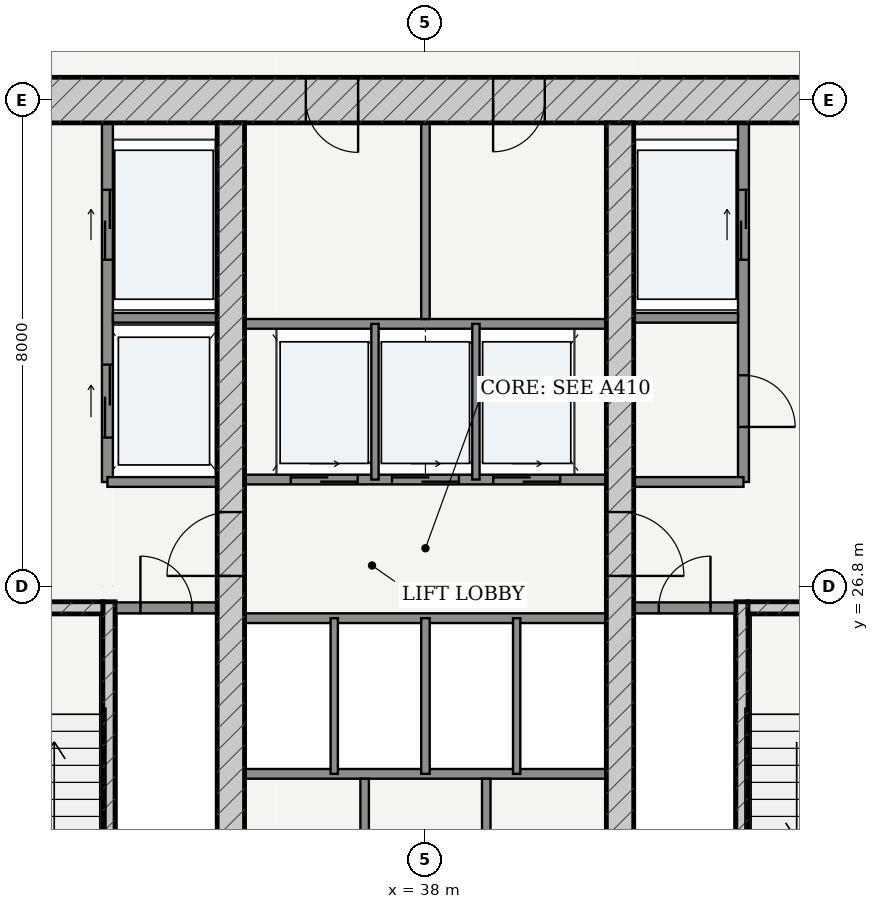
"""IFC4 building model, lengths in metres.
Left out: names, types, materials, properties, quantities, classifications, styles, units other than length and angle.
Written with IfcOpenShell. Run it as: python <this file> out.ifc"""

import sys

from ifc_helpers import new_model, si_unit, direction, frame, frame_2d, origin, place, context, subcontext, project, spatial, rectangle, extrude, source, transform, mapped, element, fill, save


model = new_model("IFC4")
c1 = context("Model", 3, precision=1e-05, world=origin(), true_north=direction((-0.2419218956, 0.970295726276)))
c2 = subcontext(c1, "Body", "Model", "MODEL_VIEW")
j1 = project(units=[si_unit("LENGTHUNIT", "METRE"), si_unit("PLANEANGLEUNIT", "RADIAN")], contexts=[c1])
p1 = place(None, origin())
s1 = spatial("IfcSite", under=j1, at=p1, CompositionType="ELEMENT")
p2 = place(p1, origin())
s2 = spatial("IfcBuilding", under=s1, at=p2, CompositionType="ELEMENT")
p3 = place(p2, frame((0.0, 0.0, 42.0)))
s3 = spatial("IfcBuildingStorey", under=s2, at=p3, CompositionType="ELEMENT", Elevation=42.0)
p4 = place(p3, frame((28.625, 34.8, 0.0), z_axis=(0.0, 0.0, 1.0), x_axis=(1.0, 0.0, 0.0)))
e1 = element("IfcWall", 1, at=p4, inside=s3, PredefinedType="SHEAR", context=c2, shape_type="SweptSolid", body=[
    extrude(rectangle(XDim=18.75, YDim=0.75, at=frame_2d((9.375, 0.0))), origin(), (0.0, 0.0, 1.0), 3.32),
])
p5 = place(p4, frame((7.407, 0.0, 0.0)))
e2 = element("IfcOpeningElement", 2, at=p5, cuts=e1, PredefinedType="OPENING", context=c2, shape_type="SweptSolid", body=[
    extrude(rectangle(XDim=0.86, YDim=2.1, at=frame_2d((0.43, 1.05))), frame((0.0, 0.385, 0.0), z_axis=(0.0, -1.0, 0.0), x_axis=(1.0, 0.0, 0.0)), (0.0, 0.0, 1.0), 0.77),
])
p6 = place(p4, frame((10.488, 0.0, 0.0)))
e3 = element("IfcOpeningElement", 3, at=p6, cuts=e1, PredefinedType="OPENING", context=c2, shape_type="SweptSolid", body=[
    extrude(rectangle(XDim=0.85, YDim=2.1, at=frame_2d((0.425, 1.05))), frame((0.0, 0.385, 0.0), z_axis=(0.0, -1.0, 0.0), x_axis=(1.0, 0.0, 0.0)), (0.0, 0.0, 1.0), 0.77),
])
p7 = place(p3, frame((32.795, 19.175, 0.0), z_axis=(0.0, 0.0, 1.0), x_axis=(0.0, 1.0, 0.0)))
e4 = element("IfcWall", 4, at=p7, inside=s3, PredefinedType="SOLIDWALL", context=c2, shape_type="SweptSolid", body=[
    extrude(rectangle(XDim=7.375, YDim=0.2, at=frame_2d((3.688, 0.0))), origin(), (0.0, 0.0, 1.0), 3.32),
])
p8 = place(p3, frame((29.375, 26.45, 0.0), z_axis=(0.0, 0.0, 1.0), x_axis=(1.0, 0.0, 0.0)))
e5 = element("IfcWall", 5, at=p8, inside=s3, PredefinedType="SOLIDWALL", context=c2, shape_type="SweptSolid", body=[
    extrude(rectangle(XDim=3.32, YDim=0.2, at=frame_2d((1.66, 0.0))), origin(), (0.0, 0.0, 1.0), 3.32),
])
p9 = place(p8, frame((1.185, 0.0, 0.0)))
e6 = element("IfcOpeningElement", 6, at=p9, cuts=e5, PredefinedType="OPENING", context=c2, shape_type="SweptSolid", body=[
    extrude(rectangle(XDim=0.95, YDim=2.15, at=frame_2d((0.475, 1.075))), frame((0.0, 0.11, 0.0), z_axis=(0.0, -1.0, 0.0), x_axis=(1.0, 0.0, 0.0)), (0.0, 0.0, 1.0), 0.22),
])
p10 = place(p3, frame((43.205, 19.175, 0.0), z_axis=(0.0, 0.0, 1.0), x_axis=(0.0, 1.0, 0.0)))
e7 = element("IfcWall", 7, at=p10, inside=s3, PredefinedType="SOLIDWALL", context=c2, shape_type="SweptSolid", body=[
    extrude(rectangle(XDim=7.375, YDim=0.2, at=frame_2d((3.688, 0.0))), origin(), (0.0, 0.0, 1.0), 3.32),
])
p11 = place(p3, frame((43.305, 26.45, 0.0), z_axis=(0.0, 0.0, 1.0), x_axis=(1.0, 0.0, 0.0)))
e8 = element("IfcWall", 8, at=p11, inside=s3, PredefinedType="SOLIDWALL", context=c2, shape_type="SweptSolid", body=[
    extrude(rectangle(XDim=3.32, YDim=0.2, at=frame_2d((1.66, 0.0))), origin(), (0.0, 0.0, 1.0), 3.32),
])
p12 = place(p11, frame((1.185, 0.0, 0.0)))
e9 = element("IfcOpeningElement", 9, at=p12, cuts=e8, PredefinedType="OPENING", context=c2, shape_type="SweptSolid", body=[
    extrude(rectangle(XDim=0.95, YDim=2.15, at=frame_2d((0.475, 1.075))), frame((0.0, 0.11, 0.0), z_axis=(0.0, -1.0, 0.0), x_axis=(1.0, 0.0, 0.0)), (0.0, 0.0, 1.0), 0.22),
])
p13 = place(p3, frame((34.8, 19.175, 0.0), z_axis=(0.0, 0.0, 1.0), x_axis=(0.0, 1.0, 0.0)))
e10 = element("IfcWall", 10, at=p13, inside=s3, PredefinedType="SHEAR", context=c2, shape_type="SweptSolid", body=[
    extrude(rectangle(XDim=15.25, YDim=0.45, at=frame_2d((7.625, 0.0))), origin(), (0.0, 0.0, 1.0), 3.32),
])
p14 = place(p13, frame((7.8, 0.0, 0.0)))
e11 = element("IfcOpeningElement", 11, at=p14, cuts=e10, PredefinedType="OPENING", context=c2, shape_type="SweptSolid", body=[
    extrude(rectangle(XDim=1.05, YDim=2.15, at=frame_2d((0.525, 1.075))), frame((0.0, 0.235, 0.0), z_axis=(0.0, -1.0, 0.0), x_axis=(1.0, 0.0, 0.0)), (0.0, 0.0, 1.0), 0.47),
])
p15 = place(p3, frame((41.2, 19.175, 0.0), z_axis=(0.0, 0.0, 1.0), x_axis=(0.0, 1.0, 0.0)))
e12 = element("IfcWall", 12, at=p15, inside=s3, PredefinedType="SHEAR", context=c2, shape_type="SweptSolid", body=[
    extrude(rectangle(XDim=15.25, YDim=0.45, at=frame_2d((7.625, 0.0))), origin(), (0.0, 0.0, 1.0), 3.32),
])
p16 = place(p15, frame((7.8, 0.0, 0.0)))
e13 = element("IfcOpeningElement", 13, at=p16, cuts=e12, PredefinedType="OPENING", context=c2, shape_type="SweptSolid", body=[
    extrude(rectangle(XDim=1.05, YDim=2.15, at=frame_2d((0.525, 1.075))), frame((0.0, 0.235, 0.0), z_axis=(0.0, -1.0, 0.0), x_axis=(1.0, 0.0, 0.0)), (0.0, 0.0, 1.0), 0.47),
])
p17 = place(p3, frame((32.9, 26.45, 0.0), z_axis=(0.0, 0.0, 1.0), x_axis=(1.0, 0.0, 0.0)))
e14 = element("IfcWall", 14, at=p17, inside=s3, PredefinedType="PARTITIONING", context=c2, shape_type="SweptSolid", body=[
    extrude(rectangle(XDim=1.675, YDim=0.18, at=frame_2d((0.837, 0.0))), origin(), (0.0, 0.0, 1.0), 3.32),
])
p18 = place(p17, frame((0.413, 0.0, 0.0)))
e15 = element("IfcOpeningElement", 15, at=p18, cuts=e14, PredefinedType="OPENING", context=c2, shape_type="SweptSolid", body=[
    extrude(rectangle(XDim=0.85, YDim=2.1, at=frame_2d((0.425, 1.05))), frame((0.0, 0.1, 0.0), z_axis=(0.0, -1.0, 0.0), x_axis=(1.0, 0.0, 0.0)), (0.0, 0.0, 1.0), 0.2),
])
p19 = place(p3, frame((41.425, 26.45, 0.0), z_axis=(0.0, 0.0, 1.0), x_axis=(1.0, 0.0, 0.0)))
e16 = element("IfcWall", 16, at=p19, inside=s3, PredefinedType="PARTITIONING", context=c2, shape_type="SweptSolid", body=[
    extrude(rectangle(XDim=1.675, YDim=0.18, at=frame_2d((0.837, 0.0))), origin(), (0.0, 0.0, 1.0), 3.32),
])
p20 = place(p19, frame((0.413, 0.0, 0.0)))
e17 = element("IfcOpeningElement", 17, at=p20, cuts=e16, PredefinedType="OPENING", context=c2, shape_type="SweptSolid", body=[
    extrude(rectangle(XDim=0.85, YDim=2.1, at=frame_2d((0.425, 1.05))), frame((0.0, 0.1, 0.0), z_axis=(0.0, -1.0, 0.0), x_axis=(1.0, 0.0, 0.0)), (0.0, 0.0, 1.0), 0.2),
])
p21 = place(p3, frame((32.77, 28.52, 0.0), z_axis=(0.0, 0.0, 1.0), x_axis=(0.0, 1.0, 0.0)))
e18 = element("IfcWall", 18, at=p21, inside=s3, PredefinedType="PARTITIONING", context=c2, shape_type="SweptSolid", body=[
    extrude(rectangle(XDim=5.905, YDim=0.18, at=frame_2d((2.953, 0.0))), origin(), (0.0, 0.0, 1.0), 3.32),
])
p22 = place(p21, frame((3.655, 0.0, 0.0)))
e19 = element("IfcOpeningElement", 19, at=p22, cuts=e18, PredefinedType="OPENING", context=c2, shape_type="SweptSolid", body=[
    extrude(rectangle(XDim=1.15, YDim=2.2, at=frame_2d((0.575, 1.1))), frame((0.0, 0.1, 0.0), z_axis=(0.0, -1.0, 0.0), x_axis=(1.0, 0.0, 0.0)), (0.0, 0.0, 1.0), 0.2),
])
p23 = place(p21, frame((0.73, 0.0, 0.0)))
e20 = element("IfcOpeningElement", 20, at=p23, cuts=e18, PredefinedType="OPENING", context=c2, shape_type="SweptSolid", body=[
    extrude(rectangle(XDim=1.2, YDim=2.25, at=frame_2d((0.6, 1.125))), frame((0.0, 0.1, 0.0), z_axis=(0.0, -1.0, 0.0), x_axis=(1.0, 0.0, 0.0)), (0.0, 0.0, 1.0), 0.2),
])
p24 = place(p3, frame((32.86, 31.22, 0.0), z_axis=(0.0, 0.0, 1.0), x_axis=(1.0, 0.0, 0.0)))
e21 = element("IfcWall", 21, at=p24, inside=s3, PredefinedType="PARTITIONING", context=c2, shape_type="SweptSolid", body=[
    extrude(rectangle(XDim=1.715, YDim=0.16, at=frame_2d((0.857, 0.0))), origin(), (0.0, 0.0, 1.0), 3.32),
])
p25 = place(p3, frame((32.77, 28.52, 0.0), z_axis=(0.0, 0.0, 1.0), x_axis=(1.0, 0.0, 0.0)))
e22 = element("IfcWall", 22, at=p25, inside=s3, PredefinedType="PARTITIONING", context=c2, shape_type="SweptSolid", body=[
    extrude(rectangle(XDim=1.805, YDim=0.16, at=frame_2d((0.902, 0.0))), origin(), (0.0, 0.0, 1.0), 3.32),
])
p26 = place(p3, frame((43.23, 28.52, 0.0), z_axis=(0.0, 0.0, 1.0), x_axis=(0.0, 1.0, 0.0)))
e23 = element("IfcWall", 23, at=p26, inside=s3, PredefinedType="PARTITIONING", context=c2, shape_type="SweptSolid", body=[
    extrude(rectangle(XDim=5.905, YDim=0.18, at=frame_2d((2.953, 0.0))), origin(), (0.0, 0.0, 1.0), 3.32),
])
p27 = place(p26, frame((0.905, 0.0, 0.0)))
e24 = element("IfcOpeningElement", 24, at=p27, cuts=e23, PredefinedType="OPENING", context=c2, shape_type="SweptSolid", body=[
    extrude(rectangle(XDim=0.85, YDim=2.1, at=frame_2d((0.425, 1.05))), frame((0.0, 0.1, 0.0), z_axis=(0.0, -1.0, 0.0), x_axis=(1.0, 0.0, 0.0)), (0.0, 0.0, 1.0), 0.2),
])
p28 = place(p26, frame((3.655, 0.0, 0.0)))
e25 = element("IfcOpeningElement", 25, at=p28, cuts=e23, PredefinedType="OPENING", context=c2, shape_type="SweptSolid", body=[
    extrude(rectangle(XDim=1.15, YDim=2.2, at=frame_2d((0.575, 1.1))), frame((0.0, 0.1, 0.0), z_axis=(0.0, -1.0, 0.0), x_axis=(1.0, 0.0, 0.0)), (0.0, 0.0, 1.0), 0.2),
])
p29 = place(p3, frame((41.425, 31.22, 0.0), z_axis=(0.0, 0.0, 1.0), x_axis=(1.0, 0.0, 0.0)))
e26 = element("IfcWall", 26, at=p29, inside=s3, PredefinedType="PARTITIONING", context=c2, shape_type="SweptSolid", body=[
    extrude(rectangle(XDim=1.715, YDim=0.16, at=frame_2d((0.857, 0.0))), origin(), (0.0, 0.0, 1.0), 3.32),
])
p30 = place(p3, frame((41.425, 28.52, 0.0), z_axis=(0.0, 0.0, 1.0), x_axis=(1.0, 0.0, 0.0)))
e27 = element("IfcWall", 27, at=p30, inside=s3, PredefinedType="PARTITIONING", context=c2, shape_type="SweptSolid", body=[
    extrude(rectangle(XDim=1.805, YDim=0.16, at=frame_2d((0.902, 0.0))), origin(), (0.0, 0.0, 1.0), 3.32),
])
p31 = place(p3, frame((35.025, 28.56, 0.0), z_axis=(0.0, 0.0, 1.0), x_axis=(1.0, 0.0, 0.0)))
e28 = element("IfcWall", 28, at=p31, inside=s3, PredefinedType="PARTITIONING", context=c2, shape_type="SweptSolid", body=[
    extrude(rectangle(XDim=5.95, YDim=0.16, at=frame_2d((2.975, 0.0))), origin(), (0.0, 0.0, 1.0), 3.32),
])
p32 = place(p31, frame((0.76, 0.0, 0.0)))
e29 = element("IfcOpeningElement", 29, at=p32, cuts=e28, PredefinedType="OPENING", context=c2, shape_type="SweptSolid", body=[
    extrude(rectangle(XDim=1.1, YDim=2.2, at=frame_2d((0.55, 1.1))), frame((0.0, 0.09, 0.0), z_axis=(0.0, -1.0, 0.0), x_axis=(1.0, 0.0, 0.0)), (0.0, 0.0, 1.0), 0.18),
])
p33 = place(p31, frame((2.425, 0.0, 0.0)))
e30 = element("IfcOpeningElement", 30, at=p33, cuts=e28, PredefinedType="OPENING", context=c2, shape_type="SweptSolid", body=[
    extrude(rectangle(XDim=1.1, YDim=2.2, at=frame_2d((0.55, 1.1))), frame((0.0, 0.09, 0.0), z_axis=(0.0, -1.0, 0.0), x_axis=(1.0, 0.0, 0.0)), (0.0, 0.0, 1.0), 0.18),
])
p34 = place(p31, frame((4.09, 0.0, 0.0)))
e31 = element("IfcOpeningElement", 31, at=p34, cuts=e28, PredefinedType="OPENING", context=c2, shape_type="SweptSolid", body=[
    extrude(rectangle(XDim=1.1, YDim=2.2, at=frame_2d((0.55, 1.1))), frame((0.0, 0.09, 0.0), z_axis=(0.0, -1.0, 0.0), x_axis=(1.0, 0.0, 0.0)), (0.0, 0.0, 1.0), 0.18),
])
p35 = place(p3, frame((35.025, 31.12, 0.0), z_axis=(0.0, 0.0, 1.0), x_axis=(1.0, 0.0, 0.0)))
e32 = element("IfcWall", 32, at=p35, inside=s3, PredefinedType="PARTITIONING", context=c2, shape_type="SweptSolid", body=[
    extrude(rectangle(XDim=5.95, YDim=0.16, at=frame_2d((2.975, 0.0))), origin(), (0.0, 0.0, 1.0), 3.32),
])
for number, where, z_axis, x_axis in (
    (33, (37.17, 28.56, 0.0), (0.0, 0.0, 1.0), (0.0, 1.0, 0.0)),
    (34, (38.83, 28.56, 0.0), (0.0, 0.0, 1.0), (0.0, 1.0, 0.0)),
):
    element("IfcWall", number, at=place(p3, frame(where, z_axis=z_axis, x_axis=x_axis)), inside=s3, PredefinedType="PARTITIONING", context=c2, shape_type="SweptSolid", body=[
        extrude(rectangle(XDim=2.56, YDim=0.12, at=frame_2d((1.28, 0.0))), origin(), (0.0, 0.0, 1.0), 3.32),
    ])
p36 = place(p3, frame((38.0, 31.2, 0.0), z_axis=(0.0, 0.0, 1.0), x_axis=(0.0, 1.0, 0.0)))
e35 = element("IfcWall", 35, at=p36, inside=s3, PredefinedType="PARTITIONING", context=c2, shape_type="SweptSolid", body=[
    extrude(rectangle(XDim=3.225, YDim=0.14, at=frame_2d((1.613, 0.0))), origin(), (0.0, 0.0, 1.0), 3.32),
])
for number, where, z_axis, x_axis in (
    (36, (35.025, 26.28, 0.0), (0.0, 0.0, 1.0), (1.0, 0.0, 0.0)),
    (37, (35.025, 23.72, 0.0), (0.0, 0.0, 1.0), (1.0, 0.0, 0.0)),
):
    element("IfcWall", number, at=place(p3, frame(where, z_axis=z_axis, x_axis=x_axis)), inside=s3, PredefinedType="PARTITIONING", context=c2, shape_type="SweptSolid", body=[
        extrude(rectangle(XDim=5.95, YDim=0.16, at=frame_2d((2.975, 0.0))), origin(), (0.0, 0.0, 1.0), 3.32),
    ])
p37 = place(p3, frame((36.5, 23.72, 0.0), z_axis=(0.0, 0.0, 1.0), x_axis=(0.0, 1.0, 0.0)))
e38 = element("IfcWall", 38, at=p37, inside=s3, PredefinedType="PARTITIONING", context=c2, shape_type="SweptSolid", body=[
    extrude(rectangle(XDim=2.56, YDim=0.12, at=frame_2d((1.28, 0.0))), origin(), (0.0, 0.0, 1.0), 3.32),
])
p38 = place(p3, frame((38.0, 23.72, 0.0), z_axis=(0.0, 0.0, 1.0), x_axis=(0.0, 1.0, 0.0)))
e39 = element("IfcWall", 39, at=p38, inside=s3, PredefinedType="PARTITIONING", context=c2, shape_type="SweptSolid", body=[
    extrude(rectangle(XDim=2.56, YDim=0.14, at=frame_2d((1.28, 0.0))), origin(), (0.0, 0.0, 1.0), 3.32),
])
p39 = place(p3, frame((39.5, 23.72, 0.0), z_axis=(0.0, 0.0, 1.0), x_axis=(0.0, 1.0, 0.0)))
e40 = element("IfcWall", 40, at=p39, inside=s3, PredefinedType="PARTITIONING", context=c2, shape_type="SweptSolid", body=[
    extrude(rectangle(XDim=2.56, YDim=0.12, at=frame_2d((1.28, 0.0))), origin(), (0.0, 0.0, 1.0), 3.32),
])
p40 = place(p3, frame((37.0, 19.175, 0.0), z_axis=(0.0, 0.0, 1.0), x_axis=(0.0, 1.0, 0.0)))
e41 = element("IfcWall", 41, at=p40, inside=s3, PredefinedType="PARTITIONING", context=c2, shape_type="SweptSolid", body=[
    extrude(rectangle(XDim=4.465, YDim=0.14, at=frame_2d((2.232, 0.0))), origin(), (0.0, 0.0, 1.0), 3.32),
])
p41 = place(p40, frame((1.808, 0.0, 0.0)))
e42 = element("IfcOpeningElement", 42, at=p41, cuts=e41, PredefinedType="OPENING", context=c2, shape_type="SweptSolid", body=[
    extrude(rectangle(XDim=0.85, YDim=2.1, at=frame_2d((0.425, 1.05))), frame((0.0, 0.08, 0.0), z_axis=(0.0, -1.0, 0.0), x_axis=(1.0, 0.0, 0.0)), (0.0, 0.0, 1.0), 0.16),
])
p42 = place(p3, frame((39.0, 19.175, 0.0), z_axis=(0.0, 0.0, 1.0), x_axis=(0.0, 1.0, 0.0)))
e43 = element("IfcWall", 43, at=p42, inside=s3, PredefinedType="PARTITIONING", context=c2, shape_type="SweptSolid", body=[
    extrude(rectangle(XDim=4.465, YDim=0.14, at=frame_2d((2.232, 0.0))), origin(), (0.0, 0.0, 1.0), 3.32),
])
p43 = place(p42, frame((1.808, 0.0, 0.0)))
e44 = element("IfcOpeningElement", 44, at=p43, cuts=e43, PredefinedType="OPENING", context=c2, shape_type="SweptSolid", body=[
    extrude(rectangle(XDim=0.85, YDim=2.1, at=frame_2d((0.425, 1.05))), frame((0.0, 0.08, 0.0), z_axis=(0.0, -1.0, 0.0), x_axis=(1.0, 0.0, 0.0)), (0.0, 0.0, 1.0), 0.16),
])
m1 = source(origin(), c2, "Body", "SweptSolid", [
    extrude(rectangle(XDim=1.05, YDim=2.15, at=frame_2d((0.525, 1.075))), frame((0.0, 0.025, 0.0), z_axis=(0.0, -1.0, 0.0), x_axis=(1.0, 0.0, 0.0)), (0.0, 0.0, 1.0), 0.05),
])
p44 = place(p14, origin())
e45 = element("IfcDoor", 45, at=p44, inside=s3, OperationType="SINGLE_SWING_LEFT", PredefinedType="DOOR", context=c2, shape_type="MappedRepresentation", body=[
    mapped(m1, transform((0.0, 0.0, 0.0), scale=1.0)),
])
fill(e11, e45)
p45 = place(p16, frame((1.05, 0.0, 0.0), z_axis=(0.0, 0.0, 1.0), x_axis=(-1.0, 0.0, 0.0)))
e46 = element("IfcDoor", 46, at=p45, inside=s3, OperationType="SINGLE_SWING_RIGHT", PredefinedType="DOOR", context=c2, shape_type="MappedRepresentation", body=[
    mapped(m1, transform((0.0, 0.0, 0.0), scale=1.0)),
])
fill(e13, e46)
m2 = source(origin(), c2, "Body", "SweptSolid", [
    extrude(rectangle(XDim=0.85, YDim=2.1, at=frame_2d((0.425, 1.05))), frame((0.0, 0.025, 0.0), z_axis=(0.0, -1.0, 0.0), x_axis=(1.0, 0.0, 0.0)), (0.0, 0.0, 1.0), 0.05),
])
p46 = place(p18, origin())
e47 = element("IfcDoor", 47, at=p46, inside=s3, OperationType="SINGLE_SWING_LEFT", PredefinedType="DOOR", context=c2, shape_type="MappedRepresentation", body=[
    mapped(m2, transform((0.0, 0.0, 0.0), scale=1.0)),
])
fill(e15, e47)
p47 = place(p20, origin())
e48 = element("IfcDoor", 48, at=p47, inside=s3, OperationType="SINGLE_SWING_RIGHT", PredefinedType="DOOR", context=c2, shape_type="MappedRepresentation", body=[
    mapped(m2, transform((0.0, 0.0, 0.0), scale=1.0)),
])
fill(e17, e48)
p48 = place(p27, frame((0.85, 0.0, 0.0), z_axis=(0.0, 0.0, 1.0), x_axis=(-1.0, 0.0, 0.0)))
e49 = element("IfcDoor", 49, at=p48, inside=s3, OperationType="SINGLE_SWING_RIGHT", PredefinedType="DOOR", context=c2, shape_type="MappedRepresentation", body=[
    mapped(m2, transform((0.0, 0.0, 0.0), scale=1.0)),
])
fill(e24, e49)
m3 = source(origin(), c2, "Body", "SweptSolid", [
    extrude(rectangle(XDim=0.86, YDim=2.1, at=frame_2d((0.43, 1.05))), frame((0.0, 0.025, 0.0), z_axis=(0.0, -1.0, 0.0), x_axis=(1.0, 0.0, 0.0)), (0.0, 0.0, 1.0), 0.05),
])
p49 = place(p5, frame((0.86, 0.0, 0.0), z_axis=(0.0, 0.0, 1.0), x_axis=(-1.0, 0.0, 0.0)))
e50 = element("IfcDoor", 50, at=p49, inside=s3, OperationType="SINGLE_SWING_LEFT", PredefinedType="DOOR", context=c2, shape_type="MappedRepresentation", body=[
    mapped(m3, transform((0.0, 0.0, 0.0), scale=1.0)),
])
fill(e2, e50)
p50 = place(p6, frame((0.85, 0.0, 0.0), z_axis=(0.0, 0.0, 1.0), x_axis=(-1.0, 0.0, 0.0)))
e51 = element("IfcDoor", 51, at=p50, inside=s3, OperationType="SINGLE_SWING_RIGHT", PredefinedType="DOOR", context=c2, shape_type="MappedRepresentation", body=[
    mapped(m2, transform((0.0, 0.0, 0.0), scale=1.0)),
])
fill(e3, e51)
m4 = source(origin(), c2, "Body", "SweptSolid", [
    extrude(rectangle(XDim=1.15, YDim=2.2, at=frame_2d((0.575, 1.1))), frame((0.0, 0.025, 0.0), z_axis=(0.0, -1.0, 0.0), x_axis=(1.0, 0.0, 0.0)), (0.0, 0.0, 1.0), 0.05),
])
p51 = place(p22, origin())
e52 = element("IfcDoor", 52, at=p51, inside=s3, OperationType="DOUBLE_DOOR_SLIDING", PredefinedType="DOOR", context=c2, shape_type="MappedRepresentation", body=[
    mapped(m4, transform((0.0, 0.0, 0.0), scale=1.0)),
])
fill(e19, e52)
p52 = place(p28, origin())
e53 = element("IfcDoor", 53, at=p52, inside=s3, OperationType="DOUBLE_DOOR_SLIDING", PredefinedType="DOOR", context=c2, shape_type="MappedRepresentation", body=[
    mapped(m4, transform((0.0, 0.0, 0.0), scale=1.0)),
])
fill(e25, e53)
m5 = source(origin(), c2, "Body", "SweptSolid", [
    extrude(rectangle(XDim=1.2, YDim=2.25, at=frame_2d((0.6, 1.125))), frame((0.0, 0.025, 0.0), z_axis=(0.0, -1.0, 0.0), x_axis=(1.0, 0.0, 0.0)), (0.0, 0.0, 1.0), 0.05),
])
p53 = place(p23, origin())
e54 = element("IfcDoor", 54, at=p53, inside=s3, OperationType="DOUBLE_DOOR_SLIDING", PredefinedType="DOOR", context=c2, shape_type="MappedRepresentation", body=[
    mapped(m5, transform((0.0, 0.0, 0.0), scale=1.0)),
])
fill(e20, e54)
m6 = source(origin(), c2, "Body", "SweptSolid", [
    extrude(rectangle(XDim=1.1, YDim=2.2, at=frame_2d((0.55, 1.1))), frame((0.0, 0.025, 0.0), z_axis=(0.0, -1.0, 0.0), x_axis=(1.0, 0.0, 0.0)), (0.0, 0.0, 1.0), 0.05),
])
p54 = place(p32, origin())
e55 = element("IfcDoor", 55, at=p54, inside=s3, OperationType="DOUBLE_DOOR_SLIDING", PredefinedType="DOOR", context=c2, shape_type="MappedRepresentation", body=[
    mapped(m6, transform((0.0, 0.0, 0.0), scale=1.0)),
])
fill(e29, e55)
p55 = place(p33, origin())
e56 = element("IfcDoor", 56, at=p55, inside=s3, OperationType="DOUBLE_DOOR_SLIDING", PredefinedType="DOOR", context=c2, shape_type="MappedRepresentation", body=[
    mapped(m6, transform((0.0, 0.0, 0.0), scale=1.0)),
])
fill(e30, e56)
p56 = place(p34, origin())
e57 = element("IfcDoor", 57, at=p56, inside=s3, OperationType="DOUBLE_DOOR_SLIDING", PredefinedType="DOOR", context=c2, shape_type="MappedRepresentation", body=[
    mapped(m6, transform((0.0, 0.0, 0.0), scale=1.0)),
])
fill(e31, e57)
save(model, sys.argv[1])
